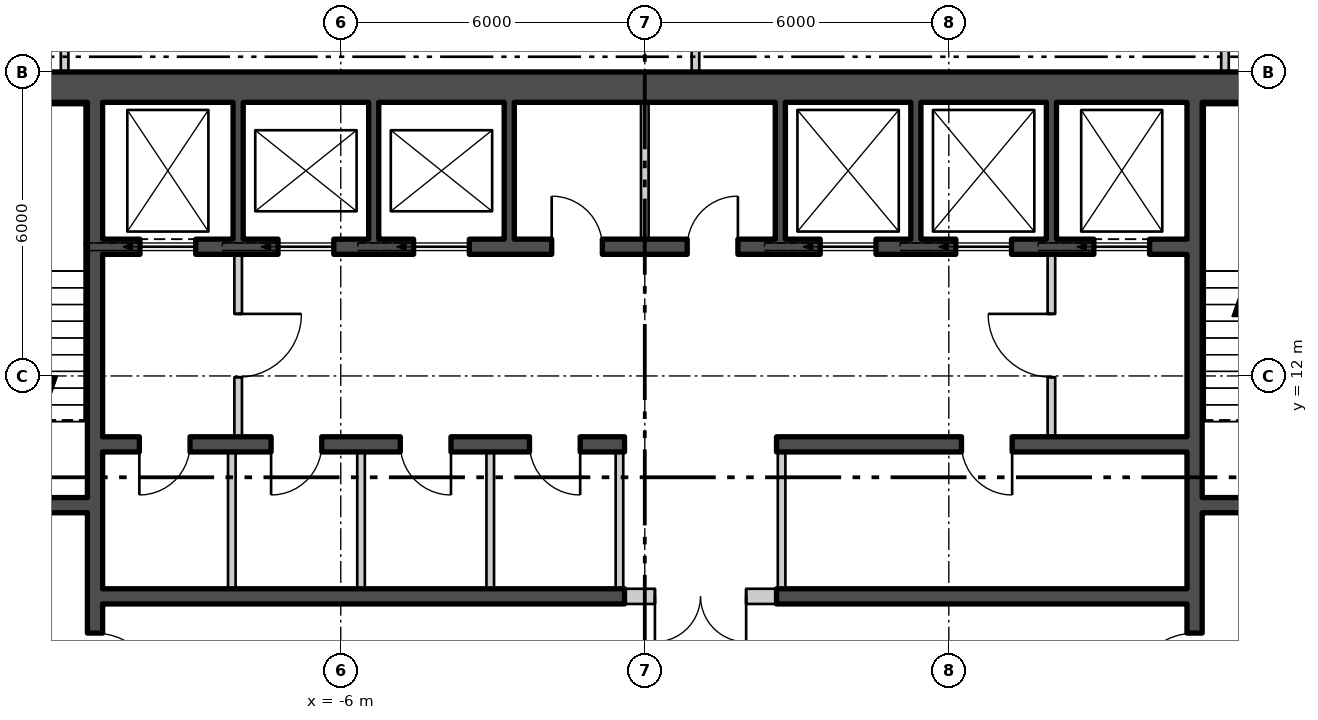
"""IFC4 building model, lengths in metres.
Left out: names, types, materials, properties, quantities, classifications, styles, units other than length and angle.
Written with IfcOpenShell. Run it as: python <this file> out.ifc"""

import sys

from ifc_helpers import new_model, si_unit, direction, frame, frame_2d, origin, place, context, subcontext, project, spatial, rectangle, extrude, element, fill, save


model = new_model("IFC4")
c1 = context("Model", 3, precision=1e-05, world=origin(), true_north=direction((0.0, 1.0)))
c2 = subcontext(c1, "Body", "Model", "MODEL_VIEW")
j1 = project(units=[si_unit("LENGTHUNIT", "METRE"), si_unit("PLANEANGLEUNIT", "RADIAN")], contexts=[c1])
p1 = place(None, origin())
s1 = spatial("IfcSite", under=j1, at=p1, CompositionType="ELEMENT")
p2 = place(p1, origin())
s2 = spatial("IfcBuilding", under=s1, at=p2, CompositionType="ELEMENT")
p3 = place(p2, frame((0.0, 0.0, -5.7)))
s3 = spatial("IfcBuildingStorey", under=s2, at=p3, CompositionType="ELEMENT", Elevation=-5.7)
p4 = place(p3, frame((-17.5, 17.7, 0.0), z_axis=(0.0, 0.0, 1.0), x_axis=(1.0, 0.0, 0.0)))
e1 = element("IfcWall", 1, at=p4, inside=s3, PredefinedType="SHEAR", context=c2, shape_type="SweptSolid", body=[
    extrude(rectangle(XDim=35.0, YDim=0.6, at=frame_2d((17.5, 0.0))), origin(), (0.0, 0.0, 1.0), 5.25),
])
p5 = place(p3, frame((-10.85, 0.6, 0.0), z_axis=(0.0, 0.0, 1.0), x_axis=(0.0, 1.0, 0.0)))
e2 = element("IfcWall", 2, at=p5, inside=s3, PredefinedType="SHEAR", context=c2, shape_type="SweptSolid", body=[
    extrude(rectangle(XDim=16.8, YDim=0.3, at=frame_2d((8.4, 0.0))), origin(), (0.0, 0.0, 1.0), 5.25),
])
p6 = place(p5, frame((5.075, 0.0, 0.0)))
e3 = element("IfcOpeningElement", 3, at=p6, cuts=e2, PredefinedType="OPENING", context=c2, shape_type="SweptSolid", body=[
    extrude(rectangle(XDim=1.25, YDim=2.1, at=frame_2d((0.625, 1.05))), frame((0.0, 0.16, 0.0), z_axis=(0.0, -1.0, 0.0), x_axis=(1.0, 0.0, 0.0)), (0.0, 0.0, 1.0), 0.32),
])
p7 = place(p5, frame((1.525, 0.0, 0.0)))
e4 = element("IfcOpeningElement", 4, at=p7, cuts=e2, PredefinedType="OPENING", context=c2, shape_type="SweptSolid", body=[
    extrude(rectangle(XDim=1.0, YDim=2.1, at=frame_2d((0.5, 1.05))), frame((0.0, 0.16, 0.0), z_axis=(0.0, -1.0, 0.0), x_axis=(1.0, 0.0, 0.0)), (0.0, 0.0, 1.0), 0.32),
])
p8 = place(p3, frame((-14.2, 9.45, 0.0), z_axis=(0.0, 0.0, 1.0), x_axis=(1.0, 0.0, 0.0)))
e5 = element("IfcWall", 5, at=p8, inside=s3, PredefinedType="SHEAR", context=c2, shape_type="SweptSolid", body=[
    extrude(rectangle(XDim=3.2, YDim=0.3, at=frame_2d((1.6, 0.0))), origin(), (0.0, 0.0, 1.0), 5.25),
])
p9 = place(p8, frame((1.0, 0.0, 0.0)))
e6 = element("IfcOpeningElement", 6, at=p9, cuts=e5, PredefinedType="OPENING", context=c2, shape_type="SweptSolid", body=[
    extrude(rectangle(XDim=1.2, YDim=2.1, at=frame_2d((0.6, 1.05))), frame((0.0, 0.16, 0.0), z_axis=(0.0, -1.0, 0.0), x_axis=(1.0, 0.0, 0.0)), (0.0, 0.0, 1.0), 0.32),
])
p10 = place(p3, frame((10.85, 0.6, 0.0), z_axis=(0.0, 0.0, 1.0), x_axis=(0.0, 1.0, 0.0)))
e7 = element("IfcWall", 7, at=p10, inside=s3, PredefinedType="SHEAR", context=c2, shape_type="SweptSolid", body=[
    extrude(rectangle(XDim=16.8, YDim=0.3, at=frame_2d((8.4, 0.0))), origin(), (0.0, 0.0, 1.0), 5.25),
])
p11 = place(p10, frame((5.075, 0.0, 0.0)))
e8 = element("IfcOpeningElement", 8, at=p11, cuts=e7, PredefinedType="OPENING", context=c2, shape_type="SweptSolid", body=[
    extrude(rectangle(XDim=1.25, YDim=2.1, at=frame_2d((0.625, 1.05))), frame((0.0, 0.16, 0.0), z_axis=(0.0, -1.0, 0.0), x_axis=(1.0, 0.0, 0.0)), (0.0, 0.0, 1.0), 0.32),
])
p12 = place(p10, frame((1.525, 0.0, 0.0)))
e9 = element("IfcOpeningElement", 9, at=p12, cuts=e7, PredefinedType="OPENING", context=c2, shape_type="SweptSolid", body=[
    extrude(rectangle(XDim=1.0, YDim=2.1, at=frame_2d((0.5, 1.05))), frame((0.0, 0.16, 0.0), z_axis=(0.0, -1.0, 0.0), x_axis=(1.0, 0.0, 0.0)), (0.0, 0.0, 1.0), 0.32),
])
p13 = place(p3, frame((11.0, 9.45, 0.0), z_axis=(0.0, 0.0, 1.0), x_axis=(1.0, 0.0, 0.0)))
e10 = element("IfcWall", 10, at=p13, inside=s3, PredefinedType="SHEAR", context=c2, shape_type="SweptSolid", body=[
    extrude(rectangle(XDim=3.2, YDim=0.3, at=frame_2d((1.6, 0.0))), origin(), (0.0, 0.0, 1.0), 5.25),
])
p14 = place(p13, frame((1.0, 0.0, 0.0)))
e11 = element("IfcOpeningElement", 11, at=p14, cuts=e10, PredefinedType="OPENING", context=c2, shape_type="SweptSolid", body=[
    extrude(rectangle(XDim=1.2, YDim=2.1, at=frame_2d((0.6, 1.05))), frame((0.0, 0.16, 0.0), z_axis=(0.0, -1.0, 0.0), x_axis=(1.0, 0.0, 0.0)), (0.0, 0.0, 1.0), 0.32),
])
p15 = place(p3, frame((-10.7, 14.55, 0.0), z_axis=(0.0, 0.0, 1.0), x_axis=(1.0, 0.0, 0.0)))
e12 = element("IfcWall", 12, at=p15, inside=s3, PredefinedType="SHEAR", context=c2, shape_type="SweptSolid", body=[
    extrude(rectangle(XDim=21.4, YDim=0.3, at=frame_2d((10.7, 0.0))), origin(), (0.0, 0.0, 1.0), 5.25),
])
p16 = place(p15, frame((0.738, 0.0, 0.0)))
e13 = element("IfcOpeningElement", 13, at=p16, cuts=e12, PredefinedType="OPENING", context=c2, shape_type="SweptSolid", body=[
    extrude(rectangle(XDim=1.1, YDim=2.1, at=frame_2d((0.55, 1.05))), frame((0.0, 0.16, 0.0), z_axis=(0.0, -1.0, 0.0), x_axis=(1.0, 0.0, 0.0)), (0.0, 0.0, 1.0), 0.32),
])
p17 = place(p15, frame((3.462, 0.0, 0.0)))
e14 = element("IfcOpeningElement", 14, at=p17, cuts=e12, PredefinedType="OPENING", context=c2, shape_type="SweptSolid", body=[
    extrude(rectangle(XDim=1.1, YDim=2.1, at=frame_2d((0.55, 1.05))), frame((0.0, 0.16, 0.0), z_axis=(0.0, -1.0, 0.0), x_axis=(1.0, 0.0, 0.0)), (0.0, 0.0, 1.0), 0.32),
])
p18 = place(p15, frame((6.138, 0.0, 0.0)))
e15 = element("IfcOpeningElement", 15, at=p18, cuts=e12, PredefinedType="OPENING", context=c2, shape_type="SweptSolid", body=[
    extrude(rectangle(XDim=1.1, YDim=2.1, at=frame_2d((0.55, 1.05))), frame((0.0, 0.16, 0.0), z_axis=(0.0, -1.0, 0.0), x_axis=(1.0, 0.0, 0.0)), (0.0, 0.0, 1.0), 0.32),
])
p19 = place(p15, frame((14.162, 0.0, 0.0)))
e16 = element("IfcOpeningElement", 16, at=p19, cuts=e12, PredefinedType="OPENING", context=c2, shape_type="SweptSolid", body=[
    extrude(rectangle(XDim=1.1, YDim=2.1, at=frame_2d((0.55, 1.05))), frame((0.0, 0.16, 0.0), z_axis=(0.0, -1.0, 0.0), x_axis=(1.0, 0.0, 0.0)), (0.0, 0.0, 1.0), 0.32),
])
p20 = place(p15, frame((16.837, 0.0, 0.0)))
e17 = element("IfcOpeningElement", 17, at=p20, cuts=e12, PredefinedType="OPENING", context=c2, shape_type="SweptSolid", body=[
    extrude(rectangle(XDim=1.1, YDim=2.1, at=frame_2d((0.55, 1.05))), frame((0.0, 0.16, 0.0), z_axis=(0.0, -1.0, 0.0), x_axis=(1.0, 0.0, 0.0)), (0.0, 0.0, 1.0), 0.32),
])
p21 = place(p15, frame((19.562, 0.0, 0.0)))
e18 = element("IfcOpeningElement", 18, at=p21, cuts=e12, PredefinedType="OPENING", context=c2, shape_type="SweptSolid", body=[
    extrude(rectangle(XDim=1.1, YDim=2.1, at=frame_2d((0.55, 1.05))), frame((0.0, 0.16, 0.0), z_axis=(0.0, -1.0, 0.0), x_axis=(1.0, 0.0, 0.0)), (0.0, 0.0, 1.0), 0.32),
])
p22 = place(p15, frame((8.863, 0.0, 0.0)))
e19 = element("IfcOpeningElement", 19, at=p22, cuts=e12, PredefinedType="OPENING", context=c2, shape_type="SweptSolid", body=[
    extrude(rectangle(XDim=1.0, YDim=2.1, at=frame_2d((0.5, 1.05))), frame((0.0, 0.16, 0.0), z_axis=(0.0, -1.0, 0.0), x_axis=(1.0, 0.0, 0.0)), (0.0, 0.0, 1.0), 0.32),
])
p23 = place(p15, frame((11.537, 0.0, 0.0)))
e20 = element("IfcOpeningElement", 20, at=p23, cuts=e12, PredefinedType="OPENING", context=c2, shape_type="SweptSolid", body=[
    extrude(rectangle(XDim=1.0, YDim=2.1, at=frame_2d((0.5, 1.05))), frame((0.0, 0.16, 0.0), z_axis=(0.0, -1.0, 0.0), x_axis=(1.0, 0.0, 0.0)), (0.0, 0.0, 1.0), 0.32),
])
p24 = place(p3, frame((-10.7, 10.65, 0.0), z_axis=(0.0, 0.0, 1.0), x_axis=(1.0, 0.0, 0.0)))
e21 = element("IfcWall", 21, at=p24, inside=s3, PredefinedType="SHEAR", context=c2, shape_type="SweptSolid", body=[
    extrude(rectangle(XDim=10.3, YDim=0.3, at=frame_2d((5.15, 0.0))), origin(), (0.0, 0.0, 1.0), 5.25),
])
p25 = place(p24, frame((0.725, 0.0, 0.0)))
e22 = element("IfcOpeningElement", 22, at=p25, cuts=e21, PredefinedType="OPENING", context=c2, shape_type="SweptSolid", body=[
    extrude(rectangle(XDim=1.0, YDim=2.1, at=frame_2d((0.5, 1.05))), frame((0.0, 0.16, 0.0), z_axis=(0.0, -1.0, 0.0), x_axis=(1.0, 0.0, 0.0)), (0.0, 0.0, 1.0), 0.32),
])
p26 = place(p24, frame((3.325, 0.0, 0.0)))
e23 = element("IfcOpeningElement", 23, at=p26, cuts=e21, PredefinedType="OPENING", context=c2, shape_type="SweptSolid", body=[
    extrude(rectangle(XDim=1.0, YDim=2.1, at=frame_2d((0.5, 1.05))), frame((0.0, 0.16, 0.0), z_axis=(0.0, -1.0, 0.0), x_axis=(1.0, 0.0, 0.0)), (0.0, 0.0, 1.0), 0.32),
])
p27 = place(p24, frame((5.875, 0.0, 0.0)))
e24 = element("IfcOpeningElement", 24, at=p27, cuts=e21, PredefinedType="OPENING", context=c2, shape_type="SweptSolid", body=[
    extrude(rectangle(XDim=1.0, YDim=2.1, at=frame_2d((0.5, 1.05))), frame((0.0, 0.16, 0.0), z_axis=(0.0, -1.0, 0.0), x_axis=(1.0, 0.0, 0.0)), (0.0, 0.0, 1.0), 0.32),
])
p28 = place(p24, frame((8.425, 0.0, 0.0)))
e25 = element("IfcOpeningElement", 25, at=p28, cuts=e21, PredefinedType="OPENING", context=c2, shape_type="SweptSolid", body=[
    extrude(rectangle(XDim=1.0, YDim=2.1, at=frame_2d((0.5, 1.05))), frame((0.0, 0.16, 0.0), z_axis=(0.0, -1.0, 0.0), x_axis=(1.0, 0.0, 0.0)), (0.0, 0.0, 1.0), 0.32),
])
p29 = place(p3, frame((-10.7, 7.65, 0.0), z_axis=(0.0, 0.0, 1.0), x_axis=(1.0, 0.0, 0.0)))
e26 = element("IfcWall", 26, at=p29, inside=s3, PredefinedType="SHEAR", context=c2, shape_type="SweptSolid", body=[
    extrude(rectangle(XDim=10.3, YDim=0.3, at=frame_2d((5.15, 0.0))), origin(), (0.0, 0.0, 1.0), 5.25),
])
p30 = place(p3, frame((2.6, 10.65, 0.0), z_axis=(0.0, 0.0, 1.0), x_axis=(1.0, 0.0, 0.0)))
e27 = element("IfcWall", 27, at=p30, inside=s3, PredefinedType="SHEAR", context=c2, shape_type="SweptSolid", body=[
    extrude(rectangle(XDim=8.1, YDim=0.3, at=frame_2d((4.05, 0.0))), origin(), (0.0, 0.0, 1.0), 5.25),
])
p31 = place(p30, frame((3.65, 0.0, 0.0)))
e28 = element("IfcOpeningElement", 28, at=p31, cuts=e27, PredefinedType="OPENING", context=c2, shape_type="SweptSolid", body=[
    extrude(rectangle(XDim=1.0, YDim=2.1, at=frame_2d((0.5, 1.05))), frame((0.0, 0.16, 0.0), z_axis=(0.0, -1.0, 0.0), x_axis=(1.0, 0.0, 0.0)), (0.0, 0.0, 1.0), 0.32),
])
p32 = place(p3, frame((2.6, 7.65, 0.0), z_axis=(0.0, 0.0, 1.0), x_axis=(1.0, 0.0, 0.0)))
e29 = element("IfcWall", 29, at=p32, inside=s3, PredefinedType="SHEAR", context=c2, shape_type="SweptSolid", body=[
    extrude(rectangle(XDim=8.1, YDim=0.3, at=frame_2d((4.05, 0.0))), origin(), (0.0, 0.0, 1.0), 5.25),
])
for number, where, z_axis, x_axis in (
    (30, (-8.025, 14.7, 0.0), (0.0, 0.0, 1.0), (0.0, 1.0, 0.0)),
    (31, (-5.35, 14.7, 0.0), (0.0, 0.0, 1.0), (0.0, 1.0, 0.0)),
    (32, (-2.675, 14.7, 0.0), (0.0, 0.0, 1.0), (0.0, 1.0, 0.0)),
):
    element("IfcWall", number, at=place(p3, frame(where, z_axis=z_axis, x_axis=x_axis)), inside=s3, PredefinedType="SHEAR", context=c2, shape_type="SweptSolid", body=[
        extrude(rectangle(XDim=2.7, YDim=0.2, at=frame_2d((1.35, 0.0))), origin(), (0.0, 0.0, 1.0), 5.25),
    ])
p33 = place(p3, frame((0.0, 14.7, 0.0), z_axis=(0.0, 0.0, 1.0), x_axis=(0.0, 1.0, 0.0)))
e33 = element("IfcWall", 33, at=p33, inside=s3, PredefinedType="PARTITIONING", context=c2, shape_type="SweptSolid", body=[
    extrude(rectangle(XDim=2.7, YDim=0.15, at=frame_2d((1.35, 0.0))), origin(), (0.0, 0.0, 1.0), 5.25),
])
for number, where, z_axis, x_axis in (
    (34, (2.675, 14.7, 0.0), (0.0, 0.0, 1.0), (0.0, 1.0, 0.0)),
    (35, (5.35, 14.7, 0.0), (0.0, 0.0, 1.0), (0.0, 1.0, 0.0)),
    (36, (8.025, 14.7, 0.0), (0.0, 0.0, 1.0), (0.0, 1.0, 0.0)),
):
    element("IfcWall", number, at=place(p3, frame(where, z_axis=z_axis, x_axis=x_axis)), inside=s3, PredefinedType="SHEAR", context=c2, shape_type="SweptSolid", body=[
        extrude(rectangle(XDim=2.7, YDim=0.2, at=frame_2d((1.35, 0.0))), origin(), (0.0, 0.0, 1.0), 5.25),
    ])
for number, where, z_axis, x_axis in (
    (37, (-8.15, 7.8, 0.0), (0.0, 0.0, 1.0), (0.0, 1.0, 0.0)),
    (38, (-5.6, 7.8, 0.0), (0.0, 0.0, 1.0), (0.0, 1.0, 0.0)),
    (39, (-3.05, 7.8, 0.0), (0.0, 0.0, 1.0), (0.0, 1.0, 0.0)),
    (40, (-0.5, 7.8, 0.0), (0.0, 0.0, 1.0), (0.0, 1.0, 0.0)),
    (41, (2.7, 7.8, 0.0), (0.0, 0.0, 1.0), (0.0, 1.0, 0.0)),
):
    element("IfcWall", number, at=place(p3, frame(where, z_axis=z_axis, x_axis=x_axis)), inside=s3, PredefinedType="PARTITIONING", context=c2, shape_type="SweptSolid", body=[
        extrude(rectangle(XDim=2.7, YDim=0.15, at=frame_2d((1.35, 0.0))), origin(), (0.0, 0.0, 1.0), 5.25),
    ])
p34 = place(p3, frame((-8.025, 10.8, 0.0), z_axis=(0.0, 0.0, 1.0), x_axis=(0.0, 1.0, 0.0)))
e42 = element("IfcWall", 42, at=p34, inside=s3, PredefinedType="PARTITIONING", context=c2, shape_type="SweptSolid", body=[
    extrude(rectangle(XDim=3.6, YDim=0.15, at=frame_2d((1.8, 0.0))), origin(), (0.0, 0.0, 1.0), 5.25),
])
p35 = place(p34, frame((1.175, 0.0, 0.0)))
e43 = element("IfcOpeningElement", 43, at=p35, cuts=e42, PredefinedType="OPENING", context=c2, shape_type="SweptSolid", body=[
    extrude(rectangle(XDim=1.25, YDim=2.1, at=frame_2d((0.625, 1.05))), frame((0.0, 0.085, 0.0), z_axis=(0.0, -1.0, 0.0), x_axis=(1.0, 0.0, 0.0)), (0.0, 0.0, 1.0), 0.17),
])
p36 = place(p3, frame((8.025, 10.8, 0.0), z_axis=(0.0, 0.0, 1.0), x_axis=(0.0, 1.0, 0.0)))
e44 = element("IfcWall", 44, at=p36, inside=s3, PredefinedType="PARTITIONING", context=c2, shape_type="SweptSolid", body=[
    extrude(rectangle(XDim=3.6, YDim=0.15, at=frame_2d((1.8, 0.0))), origin(), (0.0, 0.0, 1.0), 5.25),
])
p37 = place(p36, frame((1.175, 0.0, 0.0)))
e45 = element("IfcOpeningElement", 45, at=p37, cuts=e44, PredefinedType="OPENING", context=c2, shape_type="SweptSolid", body=[
    extrude(rectangle(XDim=1.25, YDim=2.1, at=frame_2d((0.625, 1.05))), frame((0.0, 0.085, 0.0), z_axis=(0.0, -1.0, 0.0), x_axis=(1.0, 0.0, 0.0)), (0.0, 0.0, 1.0), 0.17),
])
p38 = place(p3, frame((-0.4, 7.65, 0.0), z_axis=(0.0, 0.0, 1.0), x_axis=(1.0, 0.0, 0.0)))
e46 = element("IfcWall", 46, at=p38, inside=s3, PredefinedType="PARTITIONING", context=c2, shape_type="SweptSolid", body=[
    extrude(rectangle(XDim=3.0, YDim=0.3, at=frame_2d((1.5, 0.0))), origin(), (0.0, 0.0, 1.0), 5.25),
])
p39 = place(p38, frame((0.6, 0.0, 0.0)))
e47 = element("IfcOpeningElement", 47, at=p39, cuts=e46, PredefinedType="OPENING", context=c2, shape_type="SweptSolid", body=[
    extrude(rectangle(XDim=1.8, YDim=2.4, at=frame_2d((0.9, 1.2))), frame((0.0, 0.16, 0.0), z_axis=(0.0, -1.0, 0.0), x_axis=(1.0, 0.0, 0.0)), (0.0, 0.0, 1.0), 0.32),
])
for number, where, z_axis, x_axis in (
    (48, (-11.45, 18.0, 0.0), (0.0, 0.0, 1.0), (0.0, 1.0, 0.0)),
    (49, (1.0, 18.0, 0.0), (0.0, 0.0, 1.0), (0.0, 1.0, 0.0)),
    (50, (11.45, 18.0, 0.0), (0.0, 0.0, 1.0), (0.0, 1.0, 0.0)),
):
    element("IfcWall", number, at=place(p3, frame(where, z_axis=z_axis, x_axis=x_axis)), inside=s3, PredefinedType="PARTITIONING", context=c2, shape_type="SweptSolid", body=[
        extrude(rectangle(XDim=1.75, YDim=0.15, at=frame_2d((0.875, 0.0))), origin(), (0.0, 0.0, 1.0), 5.25),
    ])
p40 = place(p16, origin())
e51 = element("IfcDoor", 51, at=p40, inside=s3, OperationType="SLIDING_TO_LEFT", PredefinedType="DOOR", context=c2, shape_type="SweptSolid", body=[
    extrude(rectangle(XDim=1.1, YDim=2.1, at=frame_2d((0.55, 1.05))), frame((0.0, 0.025, 0.0), z_axis=(0.0, -1.0, 0.0), x_axis=(1.0, 0.0, 0.0)), (0.0, 0.0, 1.0), 0.05),
])
fill(e13, e51)
p41 = place(p17, origin())
e52 = element("IfcDoor", 52, at=p41, inside=s3, OperationType="SLIDING_TO_LEFT", PredefinedType="DOOR", context=c2, shape_type="SweptSolid", body=[
    extrude(rectangle(XDim=1.1, YDim=2.1, at=frame_2d((0.55, 1.05))), frame((0.0, 0.025, 0.0), z_axis=(0.0, -1.0, 0.0), x_axis=(1.0, 0.0, 0.0)), (0.0, 0.0, 1.0), 0.05),
])
fill(e14, e52)
p42 = place(p18, origin())
e53 = element("IfcDoor", 53, at=p42, inside=s3, OperationType="SLIDING_TO_LEFT", PredefinedType="DOOR", context=c2, shape_type="SweptSolid", body=[
    extrude(rectangle(XDim=1.1, YDim=2.1, at=frame_2d((0.55, 1.05))), frame((0.0, 0.025, 0.0), z_axis=(0.0, -1.0, 0.0), x_axis=(1.0, 0.0, 0.0)), (0.0, 0.0, 1.0), 0.05),
])
fill(e15, e53)
p43 = place(p19, origin())
e54 = element("IfcDoor", 54, at=p43, inside=s3, OperationType="SLIDING_TO_LEFT", PredefinedType="DOOR", context=c2, shape_type="SweptSolid", body=[
    extrude(rectangle(XDim=1.1, YDim=2.1, at=frame_2d((0.55, 1.05))), frame((0.0, 0.025, 0.0), z_axis=(0.0, -1.0, 0.0), x_axis=(1.0, 0.0, 0.0)), (0.0, 0.0, 1.0), 0.05),
])
fill(e16, e54)
p44 = place(p20, origin())
e55 = element("IfcDoor", 55, at=p44, inside=s3, OperationType="SLIDING_TO_LEFT", PredefinedType="DOOR", context=c2, shape_type="SweptSolid", body=[
    extrude(rectangle(XDim=1.1, YDim=2.1, at=frame_2d((0.55, 1.05))), frame((0.0, 0.025, 0.0), z_axis=(0.0, -1.0, 0.0), x_axis=(1.0, 0.0, 0.0)), (0.0, 0.0, 1.0), 0.05),
])
fill(e17, e55)
p45 = place(p21, origin())
e56 = element("IfcDoor", 56, at=p45, inside=s3, OperationType="SLIDING_TO_LEFT", PredefinedType="DOOR", context=c2, shape_type="SweptSolid", body=[
    extrude(rectangle(XDim=1.1, YDim=2.1, at=frame_2d((0.55, 1.05))), frame((0.0, 0.025, 0.0), z_axis=(0.0, -1.0, 0.0), x_axis=(1.0, 0.0, 0.0)), (0.0, 0.0, 1.0), 0.05),
])
fill(e18, e56)
p46 = place(p22, origin())
e57 = element("IfcDoor", 57, at=p46, inside=s3, OperationType="SINGLE_SWING_RIGHT", PredefinedType="DOOR", context=c2, shape_type="SweptSolid", body=[
    extrude(rectangle(XDim=1.0, YDim=2.1, at=frame_2d((0.5, 1.05))), frame((0.0, 0.025, 0.0), z_axis=(0.0, -1.0, 0.0), x_axis=(1.0, 0.0, 0.0)), (0.0, 0.0, 1.0), 0.05),
])
fill(e19, e57)
p47 = place(p23, origin())
e58 = element("IfcDoor", 58, at=p47, inside=s3, OperationType="SINGLE_SWING_LEFT", PredefinedType="DOOR", context=c2, shape_type="SweptSolid", body=[
    extrude(rectangle(XDim=1.0, YDim=2.1, at=frame_2d((0.5, 1.05))), frame((0.0, 0.025, 0.0), z_axis=(0.0, -1.0, 0.0), x_axis=(1.0, 0.0, 0.0)), (0.0, 0.0, 1.0), 0.05),
])
fill(e20, e58)
p48 = place(p25, origin())
e59 = element("IfcDoor", 59, at=p48, inside=s3, OperationType="SINGLE_SWING_LEFT", PredefinedType="DOOR", context=c2, shape_type="SweptSolid", body=[
    extrude(rectangle(XDim=1.0, YDim=2.1, at=frame_2d((0.5, 1.05))), frame((0.0, 0.025, 0.0), z_axis=(0.0, -1.0, 0.0), x_axis=(1.0, 0.0, 0.0)), (0.0, 0.0, 1.0), 0.05),
])
fill(e22, e59)
p49 = place(p26, origin())
e60 = element("IfcDoor", 60, at=p49, inside=s3, OperationType="SINGLE_SWING_LEFT", PredefinedType="DOOR", context=c2, shape_type="SweptSolid", body=[
    extrude(rectangle(XDim=1.0, YDim=2.1, at=frame_2d((0.5, 1.05))), frame((0.0, 0.025, 0.0), z_axis=(0.0, -1.0, 0.0), x_axis=(1.0, 0.0, 0.0)), (0.0, 0.0, 1.0), 0.05),
])
fill(e23, e60)
p50 = place(p27, origin())
e61 = element("IfcDoor", 61, at=p50, inside=s3, OperationType="SINGLE_SWING_RIGHT", PredefinedType="DOOR", context=c2, shape_type="SweptSolid", body=[
    extrude(rectangle(XDim=1.0, YDim=2.1, at=frame_2d((0.5, 1.05))), frame((0.0, 0.025, 0.0), z_axis=(0.0, -1.0, 0.0), x_axis=(1.0, 0.0, 0.0)), (0.0, 0.0, 1.0), 0.05),
])
fill(e24, e61)
p51 = place(p28, origin())
e62 = element("IfcDoor", 62, at=p51, inside=s3, OperationType="SINGLE_SWING_RIGHT", PredefinedType="DOOR", context=c2, shape_type="SweptSolid", body=[
    extrude(rectangle(XDim=1.0, YDim=2.1, at=frame_2d((0.5, 1.05))), frame((0.0, 0.025, 0.0), z_axis=(0.0, -1.0, 0.0), x_axis=(1.0, 0.0, 0.0)), (0.0, 0.0, 1.0), 0.05),
])
fill(e25, e62)
p52 = place(p31, origin())
e63 = element("IfcDoor", 63, at=p52, inside=s3, OperationType="SINGLE_SWING_RIGHT", PredefinedType="DOOR", context=c2, shape_type="SweptSolid", body=[
    extrude(rectangle(XDim=1.0, YDim=2.1, at=frame_2d((0.5, 1.05))), frame((0.0, 0.025, 0.0), z_axis=(0.0, -1.0, 0.0), x_axis=(1.0, 0.0, 0.0)), (0.0, 0.0, 1.0), 0.05),
])
fill(e28, e63)
p53 = place(p35, origin())
e64 = element("IfcDoor", 64, at=p53, inside=s3, OperationType="SINGLE_SWING_RIGHT", PredefinedType="DOOR", context=c2, shape_type="SweptSolid", body=[
    extrude(rectangle(XDim=1.25, YDim=2.1, at=frame_2d((0.625, 1.05))), frame((0.0, 0.025, 0.0), z_axis=(0.0, -1.0, 0.0), x_axis=(1.0, 0.0, 0.0)), (0.0, 0.0, 1.0), 0.05),
])
fill(e43, e64)
p54 = place(p6, origin())
e65 = element("IfcDoor", 65, at=p54, inside=s3, OperationType="SINGLE_SWING_LEFT", PredefinedType="DOOR", context=c2, shape_type="SweptSolid", body=[
    extrude(rectangle(XDim=1.25, YDim=2.1, at=frame_2d((0.625, 1.05))), frame((0.0, 0.025, 0.0), z_axis=(0.0, -1.0, 0.0), x_axis=(1.0, 0.0, 0.0)), (0.0, 0.0, 1.0), 0.05),
])
fill(e3, e65)
p55 = place(p37, origin())
e66 = element("IfcDoor", 66, at=p55, inside=s3, OperationType="SINGLE_SWING_LEFT", PredefinedType="DOOR", context=c2, shape_type="SweptSolid", body=[
    extrude(rectangle(XDim=1.25, YDim=2.1, at=frame_2d((0.625, 1.05))), frame((0.0, 0.025, 0.0), z_axis=(0.0, -1.0, 0.0), x_axis=(1.0, 0.0, 0.0)), (0.0, 0.0, 1.0), 0.05),
])
fill(e45, e66)
p56 = place(p11, origin())
e67 = element("IfcDoor", 67, at=p56, inside=s3, OperationType="SINGLE_SWING_RIGHT", PredefinedType="DOOR", context=c2, shape_type="SweptSolid", body=[
    extrude(rectangle(XDim=1.25, YDim=2.1, at=frame_2d((0.625, 1.05))), frame((0.0, 0.025, 0.0), z_axis=(0.0, -1.0, 0.0), x_axis=(1.0, 0.0, 0.0)), (0.0, 0.0, 1.0), 0.05),
])
fill(e8, e67)
p57 = place(p39, origin())
e68 = element("IfcDoor", 68, at=p57, inside=s3, OperationType="DOUBLE_DOOR_SINGLE_SWING", PredefinedType="DOOR", context=c2, shape_type="SweptSolid", body=[
    extrude(rectangle(XDim=1.8, YDim=2.4, at=frame_2d((0.9, 1.2))), frame((0.0, 0.025, 0.0), z_axis=(0.0, -1.0, 0.0), x_axis=(1.0, 0.0, 0.0)), (0.0, 0.0, 1.0), 0.05),
])
fill(e47, e68)
save(model, sys.argv[1])
